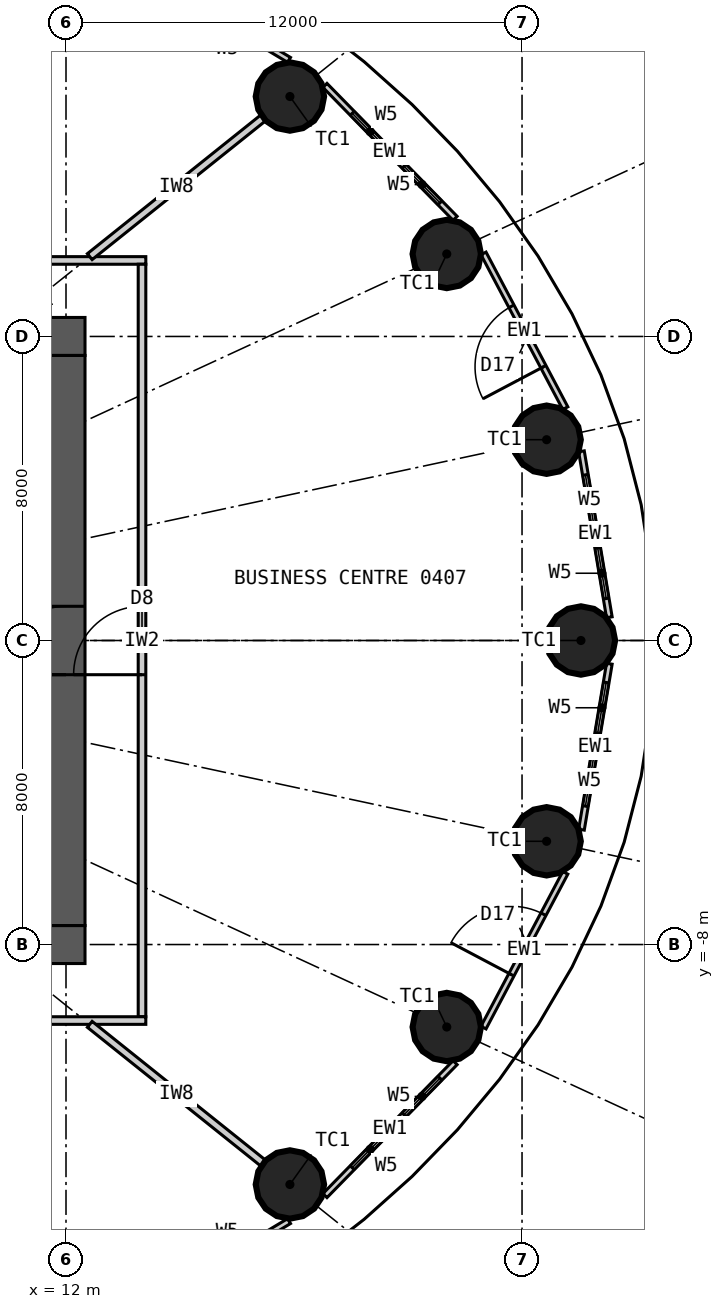
"""IFC4 building model, lengths in metres.
Left out: names, types, materials, properties, quantities, classifications, styles, units other than length and angle.
Written with IfcOpenShell. Run it as: python <this file> out.ifc"""

import sys

from ifc_helpers import new_model, si_unit, direction, frame, frame_2d, origin, origin_2d, place, context, subcontext, project, spatial, rectangle, circle, extrude, element, fill, save


model = new_model("IFC4")
c1 = context("Model", 3, precision=1e-05, world=origin(), true_north=direction((0.0, 1.0)))
c2 = subcontext(c1, "Body", "Model", "MODEL_VIEW")
j1 = project(units=[si_unit("LENGTHUNIT", "METRE"), si_unit("PLANEANGLEUNIT", "RADIAN")], contexts=[c1])
p1 = place(None, origin())
s1 = spatial("IfcSite", under=j1, at=p1, CompositionType="ELEMENT")
p2 = place(p1, origin())
s2 = spatial("IfcBuilding", under=s1, at=p2, CompositionType="ELEMENT")
p3 = place(p2, frame((0.0, 0.0, 24.6)))
s3 = spatial("IfcBuildingStorey", under=s2, at=p3, CompositionType="ELEMENT", Elevation=24.6)
for number, where, z_axis, x_axis in (
    (1, (25.55, 0.0, 0.0), (0.0, 0.0, 1.0), (1.0, 0.0, 0.0)),
    (2, (24.647, 5.283, 0.0), (0.0, 0.0, 1.0), (1.0, 0.0, 0.0)),
    (3, (22.019, 10.17, 0.0), (0.0, 0.0, 1.0), (1.0, 0.0, 0.0)),
    (4, (17.892, 14.313, 0.0), (0.0, 0.0, 1.0), (1.0, 0.0, 0.0)),
    (5, (17.892, -14.313, 0.0), (0.0, 0.0, 1.0), (1.0, 0.0, 0.0)),
    (6, (22.019, -10.17, 0.0), (0.0, 0.0, 1.0), (1.0, 0.0, 0.0)),
    (7, (24.647, -5.283, 0.0), (0.0, 0.0, 1.0), (1.0, 0.0, 0.0)),
):
    element("IfcColumn", number, at=place(p3, frame(where, z_axis=z_axis, x_axis=x_axis)), inside=s3, PredefinedType="COLUMN", context=c2, shape_type="SweptSolid", body=[
        extrude(circle(Radius=0.9, at=origin_2d()), origin(), (0.0, 0.0, 1.0), 4.8),
    ])
p4 = place(p3, frame((-12.5, 8.0, 0.0), z_axis=(0.0, 0.0, 1.0), x_axis=(1.0, 0.0, 0.0)))
e8 = element("IfcWall", 8, at=p4, inside=s3, PredefinedType="SHEAR", context=c2, shape_type="SweptSolid", body=[
    extrude(rectangle(XDim=25.0, YDim=1.0, at=frame_2d((12.5, 0.0))), origin(), (0.0, 0.0, 1.0), 4.8),
])
p5 = place(p4, frame((11.2, 0.0, 0.0)))
e9 = element("IfcOpeningElement", 9, at=p5, cuts=e8, PredefinedType="OPENING", context=c2, shape_type="SweptSolid", body=[
    extrude(rectangle(XDim=1.2, YDim=2.2, at=frame_2d((0.6, 1.1))), frame((0.0, 0.51, 0.0), z_axis=(0.0, -1.0, 0.0), x_axis=(1.0, 0.0, 0.0)), (0.0, 0.0, 1.0), 1.02),
])
p6 = place(p4, frame((18.8, 0.0, 0.0)))
e10 = element("IfcOpeningElement", 10, at=p6, cuts=e8, PredefinedType="OPENING", context=c2, shape_type="SweptSolid", body=[
    extrude(rectangle(XDim=0.9, YDim=2.2, at=frame_2d((0.45, 1.1))), frame((0.0, 0.51, 0.0), z_axis=(0.0, -1.0, 0.0), x_axis=(1.0, 0.0, 0.0)), (0.0, 0.0, 1.0), 1.02),
])
p7 = place(p3, frame((12.5, -8.0, 0.0), z_axis=(0.0, 0.0, 1.0), x_axis=(-1.0, 0.0, 0.0)))
e11 = element("IfcWall", 11, at=p7, inside=s3, PredefinedType="SHEAR", context=c2, shape_type="SweptSolid", body=[
    extrude(rectangle(XDim=25.0, YDim=1.0, at=frame_2d((12.5, 0.0))), origin(), (0.0, 0.0, 1.0), 4.8),
])
p8 = place(p7, frame((11.2, 0.0, 0.0)))
e12 = element("IfcOpeningElement", 12, at=p8, cuts=e11, PredefinedType="OPENING", context=c2, shape_type="SweptSolid", body=[
    extrude(rectangle(XDim=1.2, YDim=2.2, at=frame_2d((0.6, 1.1))), frame((0.0, 0.51, 0.0), z_axis=(0.0, -1.0, 0.0), x_axis=(1.0, 0.0, 0.0)), (0.0, 0.0, 1.0), 1.02),
])
p9 = place(p7, frame((18.8, 0.0, 0.0)))
e13 = element("IfcOpeningElement", 13, at=p9, cuts=e11, PredefinedType="OPENING", context=c2, shape_type="SweptSolid", body=[
    extrude(rectangle(XDim=0.9, YDim=2.2, at=frame_2d((0.45, 1.1))), frame((0.0, 0.51, 0.0), z_axis=(0.0, -1.0, 0.0), x_axis=(1.0, 0.0, 0.0)), (0.0, 0.0, 1.0), 1.02),
])
p10 = place(p3, frame((12.0, -7.5, 0.0), z_axis=(0.0, 0.0, 1.0), x_axis=(0.0, 1.0, 0.0)))
e14 = element("IfcWall", 14, at=p10, inside=s3, PredefinedType="SHEAR", context=c2, shape_type="SweptSolid", body=[
    extrude(rectangle(XDim=15.0, YDim=1.0, at=frame_2d((7.5, 0.0))), origin(), (0.0, 0.0, 1.0), 4.8),
])
p11 = place(p10, frame((6.6, 0.0, 0.0)))
e15 = element("IfcOpeningElement", 15, at=p11, cuts=e14, PredefinedType="OPENING", context=c2, shape_type="SweptSolid", body=[
    extrude(rectangle(XDim=1.8, YDim=2.2, at=frame_2d((0.9, 1.1))), frame((0.0, 0.51, 0.0), z_axis=(0.0, -1.0, 0.0), x_axis=(1.0, 0.0, 0.0)), (0.0, 0.0, 1.0), 1.02),
])
p12 = place(p3, frame((26.297, 0.611, 0.0), z_axis=(0.0, 0.0, 1.0), x_axis=(-0.165641751141, 0.986185991727, 0.0)))
e16 = element("IfcWall", 16, at=p12, inside=s3, PredefinedType="ELEMENTEDWALL", context=c2, shape_type="SweptSolid", body=[
    extrude(rectangle(XDim=4.428, YDim=0.15, at=frame_2d((2.214, 0.0))), origin(), (0.0, 0.0, 1.0), 4.62),
])
p13 = place(p12, frame((0.5, 0.0, 0.6)))
e17 = element("IfcOpeningElement", 17, at=p13, cuts=e16, PredefinedType="OPENING", context=c2, shape_type="SweptSolid", body=[
    extrude(rectangle(XDim=1.35, YDim=3.0, at=frame_2d((0.675, 1.5))), frame((0.0, 0.085, 0.0), z_axis=(0.0, -1.0, 0.0), x_axis=(1.0, 0.0, 0.0)), (0.0, 0.0, 1.0), 0.17),
])
p14 = place(p12, frame((2.45, 0.0, 0.6)))
e18 = element("IfcOpeningElement", 18, at=p14, cuts=e16, PredefinedType="OPENING", context=c2, shape_type="SweptSolid", body=[
    extrude(rectangle(XDim=1.35, YDim=3.0, at=frame_2d((0.675, 1.5))), frame((0.0, 0.085, 0.0), z_axis=(0.0, -1.0, 0.0), x_axis=(1.0, 0.0, 0.0)), (0.0, 0.0, 1.0), 0.17),
])
p15 = place(p3, frame((25.139, 6.113, 0.0), z_axis=(0.0, 0.0, 1.0), x_axis=(-0.467303182954, 0.884097129959, 0.0)))
e19 = element("IfcWall", 19, at=p15, inside=s3, PredefinedType="ELEMENTEDWALL", context=c2, shape_type="SweptSolid", body=[
    extrude(rectangle(XDim=4.606, YDim=0.15, at=frame_2d((2.303, 0.0))), origin(), (0.0, 0.0, 1.0), 4.62),
])
p16 = place(p15, frame((1.231, 0.0, 0.0)))
e20 = element("IfcOpeningElement", 20, at=p16, cuts=e19, PredefinedType="OPENING", context=c2, shape_type="SweptSolid", body=[
    extrude(rectangle(XDim=1.8, YDim=2.7, at=frame_2d((0.9, 1.35))), frame((0.0, 0.085, 0.0), z_axis=(0.0, -1.0, 0.0), x_axis=(1.0, 0.0, 0.0)), (0.0, 0.0, 1.0), 0.17),
])
p17 = place(p3, frame((22.239, 11.108, 0.0), z_axis=(0.0, 0.0, 1.0), x_axis=(-0.699612594083, 0.714522370679, 0.0)))
e21 = element("IfcWall", 21, at=p17, inside=s3, PredefinedType="ELEMENTEDWALL", context=c2, shape_type="SweptSolid", body=[
    extrude(rectangle(XDim=4.896, YDim=0.15, at=frame_2d((2.448, 0.0))), origin(), (0.0, 0.0, 1.0), 4.62),
])
p18 = place(p17, frame((0.569, 0.0, 0.6)))
e22 = element("IfcOpeningElement", 22, at=p18, cuts=e21, PredefinedType="OPENING", context=c2, shape_type="SweptSolid", body=[
    extrude(rectangle(XDim=1.35, YDim=3.0, at=frame_2d((0.675, 1.5))), frame((0.0, 0.085, 0.0), z_axis=(0.0, -1.0, 0.0), x_axis=(1.0, 0.0, 0.0)), (0.0, 0.0, 1.0), 0.17),
])
p19 = place(p17, frame((2.519, 0.0, 0.6)))
e23 = element("IfcOpeningElement", 23, at=p19, cuts=e21, PredefinedType="OPENING", context=c2, shape_type="SweptSolid", body=[
    extrude(rectangle(XDim=1.35, YDim=3.0, at=frame_2d((0.675, 1.5))), frame((0.0, 0.085, 0.0), z_axis=(0.0, -1.0, 0.0), x_axis=(1.0, 0.0, 0.0)), (0.0, 0.0, 1.0), 0.17),
])
p20 = place(p3, frame((17.869, 15.277, 0.0), z_axis=(0.0, 0.0, 1.0), x_axis=(-0.856958191554, 0.515385931054, 0.0)))
e24 = element("IfcWall", 24, at=p20, inside=s3, PredefinedType="ELEMENTEDWALL", context=c2, shape_type="SweptSolid", body=[
    extrude(rectangle(XDim=5.201, YDim=0.15, at=frame_2d((2.601, 0.0))), origin(), (0.0, 0.0, 1.0), 4.62),
])
p21 = place(p20, frame((0.726, 0.0, 0.6)))
e25 = element("IfcOpeningElement", 25, at=p21, cuts=e24, PredefinedType="OPENING", context=c2, shape_type="SweptSolid", body=[
    extrude(rectangle(XDim=1.35, YDim=3.0, at=frame_2d((0.675, 1.5))), frame((0.0, 0.085, 0.0), z_axis=(0.0, -1.0, 0.0), x_axis=(1.0, 0.0, 0.0)), (0.0, 0.0, 1.0), 0.17),
])
p22 = place(p20, frame((2.676, 0.0, 0.6)))
e26 = element("IfcOpeningElement", 26, at=p22, cuts=e24, PredefinedType="OPENING", context=c2, shape_type="SweptSolid", body=[
    extrude(rectangle(XDim=1.35, YDim=3.0, at=frame_2d((0.675, 1.5))), frame((0.0, 0.085, 0.0), z_axis=(0.0, -1.0, 0.0), x_axis=(1.0, 0.0, 0.0)), (0.0, 0.0, 1.0), 0.17),
])
p23 = place(p3, frame((13.412, -17.957, 0.0), z_axis=(0.0, 0.0, 1.0), x_axis=(0.856958191554, 0.515385931054, 0.0)))
e27 = element("IfcWall", 27, at=p23, inside=s3, PredefinedType="ELEMENTEDWALL", context=c2, shape_type="SweptSolid", body=[
    extrude(rectangle(XDim=5.201, YDim=0.15, at=frame_2d((2.601, 0.0))), origin(), (0.0, 0.0, 1.0), 4.62),
])
p24 = place(p23, frame((1.175, 0.0, 0.6)))
e28 = element("IfcOpeningElement", 28, at=p24, cuts=e27, PredefinedType="OPENING", context=c2, shape_type="SweptSolid", body=[
    extrude(rectangle(XDim=1.35, YDim=3.0, at=frame_2d((0.675, 1.5))), frame((0.0, 0.085, 0.0), z_axis=(0.0, -1.0, 0.0), x_axis=(1.0, 0.0, 0.0)), (0.0, 0.0, 1.0), 0.17),
])
p25 = place(p23, frame((3.125, 0.0, 0.6)))
e29 = element("IfcOpeningElement", 29, at=p25, cuts=e27, PredefinedType="OPENING", context=c2, shape_type="SweptSolid", body=[
    extrude(rectangle(XDim=1.35, YDim=3.0, at=frame_2d((0.675, 1.5))), frame((0.0, 0.085, 0.0), z_axis=(0.0, -1.0, 0.0), x_axis=(1.0, 0.0, 0.0)), (0.0, 0.0, 1.0), 0.17),
])
p26 = place(p3, frame((18.813, -14.607, 0.0), z_axis=(0.0, 0.0, 1.0), x_axis=(0.699612594083, 0.714522370679, 0.0)))
e30 = element("IfcWall", 30, at=p26, inside=s3, PredefinedType="ELEMENTEDWALL", context=c2, shape_type="SweptSolid", body=[
    extrude(rectangle(XDim=4.896, YDim=0.15, at=frame_2d((2.448, 0.0))), origin(), (0.0, 0.0, 1.0), 4.62),
])
p27 = place(p26, frame((1.027, 0.0, 0.6)))
e31 = element("IfcOpeningElement", 31, at=p27, cuts=e30, PredefinedType="OPENING", context=c2, shape_type="SweptSolid", body=[
    extrude(rectangle(XDim=1.35, YDim=3.0, at=frame_2d((0.675, 1.5))), frame((0.0, 0.085, 0.0), z_axis=(0.0, -1.0, 0.0), x_axis=(1.0, 0.0, 0.0)), (0.0, 0.0, 1.0), 0.17),
])
p28 = place(p26, frame((2.977, 0.0, 0.6)))
e32 = element("IfcOpeningElement", 32, at=p28, cuts=e30, PredefinedType="OPENING", context=c2, shape_type="SweptSolid", body=[
    extrude(rectangle(XDim=1.35, YDim=3.0, at=frame_2d((0.675, 1.5))), frame((0.0, 0.085, 0.0), z_axis=(0.0, -1.0, 0.0), x_axis=(1.0, 0.0, 0.0)), (0.0, 0.0, 1.0), 0.17),
])
p29 = place(p3, frame((22.986, -10.185, 0.0), z_axis=(0.0, 0.0, 1.0), x_axis=(0.467303182954, 0.884097129959, 0.0)))
e33 = element("IfcWall", 33, at=p29, inside=s3, PredefinedType="ELEMENTEDWALL", context=c2, shape_type="SweptSolid", body=[
    extrude(rectangle(XDim=4.606, YDim=0.15, at=frame_2d((2.303, 0.0))), origin(), (0.0, 0.0, 1.0), 4.62),
])
p30 = place(p29, frame((1.575, 0.0, 0.0)))
e34 = element("IfcOpeningElement", 34, at=p30, cuts=e33, PredefinedType="OPENING", context=c2, shape_type="SweptSolid", body=[
    extrude(rectangle(XDim=1.8, YDim=2.7, at=frame_2d((0.9, 1.35))), frame((0.0, 0.085, 0.0), z_axis=(0.0, -1.0, 0.0), x_axis=(1.0, 0.0, 0.0)), (0.0, 0.0, 1.0), 0.17),
])
p31 = place(p3, frame((25.564, -4.978, 0.0), z_axis=(0.0, 0.0, 1.0), x_axis=(0.165641751141, 0.986185991727, 0.0)))
e35 = element("IfcWall", 35, at=p31, inside=s3, PredefinedType="ELEMENTEDWALL", context=c2, shape_type="SweptSolid", body=[
    extrude(rectangle(XDim=4.428, YDim=0.15, at=frame_2d((2.214, 0.0))), origin(), (0.0, 0.0, 1.0), 4.62),
])
p32 = place(p31, frame((0.628, 0.0, 0.6)))
e36 = element("IfcOpeningElement", 36, at=p32, cuts=e35, PredefinedType="OPENING", context=c2, shape_type="SweptSolid", body=[
    extrude(rectangle(XDim=1.35, YDim=3.0, at=frame_2d((0.675, 1.5))), frame((0.0, 0.085, 0.0), z_axis=(0.0, -1.0, 0.0), x_axis=(1.0, 0.0, 0.0)), (0.0, 0.0, 1.0), 0.17),
])
p33 = place(p31, frame((2.578, 0.0, 0.6)))
e37 = element("IfcOpeningElement", 37, at=p33, cuts=e35, PredefinedType="OPENING", context=c2, shape_type="SweptSolid", body=[
    extrude(rectangle(XDim=1.35, YDim=3.0, at=frame_2d((0.675, 1.5))), frame((0.0, 0.085, 0.0), z_axis=(0.0, -1.0, 0.0), x_axis=(1.0, 0.0, 0.0)), (0.0, 0.0, 1.0), 0.17),
])
p34 = place(p3, frame((-14.1, 10.0, 0.0), z_axis=(0.0, 0.0, 1.0), x_axis=(1.0, 0.0, 0.0)))
e38 = element("IfcWall", 38, at=p34, inside=s3, PredefinedType="PARTITIONING", context=c2, shape_type="SweptSolid", body=[
    extrude(rectangle(XDim=28.2, YDim=0.2, at=frame_2d((14.1, 0.0))), origin(), (0.0, 0.0, 1.0), 4.62),
])
p35 = place(p34, frame((13.2, 0.0, 0.0)))
e39 = element("IfcOpeningElement", 39, at=p35, cuts=e38, PredefinedType="OPENING", context=c2, shape_type="SweptSolid", body=[
    extrude(rectangle(XDim=1.8, YDim=2.4, at=frame_2d((0.9, 1.2))), frame((0.0, 0.11, 0.0), z_axis=(0.0, -1.0, 0.0), x_axis=(1.0, 0.0, 0.0)), (0.0, 0.0, 1.0), 0.22),
])
p36 = place(p3, frame((14.0, -9.9, 0.0), z_axis=(0.0, 0.0, 1.0), x_axis=(0.0, 1.0, 0.0)))
e40 = element("IfcWall", 40, at=p36, inside=s3, PredefinedType="PARTITIONING", context=c2, shape_type="SweptSolid", body=[
    extrude(rectangle(XDim=19.8, YDim=0.2, at=frame_2d((9.9, 0.0))), origin(), (0.0, 0.0, 1.0), 4.62),
])
p37 = place(p36, frame((9.0, 0.0, 0.0)))
e41 = element("IfcOpeningElement", 41, at=p37, cuts=e40, PredefinedType="OPENING", context=c2, shape_type="SweptSolid", body=[
    extrude(rectangle(XDim=1.8, YDim=2.4, at=frame_2d((0.9, 1.2))), frame((0.0, 0.11, 0.0), z_axis=(0.0, -1.0, 0.0), x_axis=(1.0, 0.0, 0.0)), (0.0, 0.0, 1.0), 0.22),
])
p38 = place(p3, frame((14.1, -10.0, 0.0), z_axis=(0.0, 0.0, 1.0), x_axis=(-1.0, 0.0, 0.0)))
e42 = element("IfcWall", 42, at=p38, inside=s3, PredefinedType="PARTITIONING", context=c2, shape_type="SweptSolid", body=[
    extrude(rectangle(XDim=28.2, YDim=0.2, at=frame_2d((14.1, 0.0))), origin(), (0.0, 0.0, 1.0), 4.62),
])
p39 = place(p38, frame((13.2, 0.0, 0.0)))
e43 = element("IfcOpeningElement", 43, at=p39, cuts=e42, PredefinedType="OPENING", context=c2, shape_type="SweptSolid", body=[
    extrude(rectangle(XDim=1.8, YDim=2.4, at=frame_2d((0.9, 1.2))), frame((0.0, 0.11, 0.0), z_axis=(0.0, -1.0, 0.0), x_axis=(1.0, 0.0, 0.0)), (0.0, 0.0, 1.0), 0.22),
])
for number, where, z_axis, x_axis in (
    (44, (12.625, 10.1, 0.0), (0.0, 0.0, 1.0), (0.781, 0.625, 0.0)),
    (45, (12.625, -10.1, 0.0), (0.0, 0.0, 1.0), (0.781, -0.625, 0.0)),
):
    element("IfcWall", number, at=place(p3, frame(where, z_axis=z_axis, x_axis=x_axis)), inside=s3, PredefinedType="PARTITIONING", context=c2, shape_type="SweptSolid", body=[
        extrude(rectangle(XDim=5.845, YDim=0.2, at=frame_2d((2.922, 0.0))), origin(), (0.0, 0.0, 1.0), 3.82),
    ])
p40 = place(p13, origin())
e46 = element("IfcWindow", 46, at=p40, inside=s3, PartitioningType="SINGLE_PANEL", PredefinedType="WINDOW", context=c2, shape_type="SweptSolid", body=[
    extrude(rectangle(XDim=1.35, YDim=3.0, at=frame_2d((0.675, 1.5))), frame((0.0, 0.03, 0.0), z_axis=(0.0, -1.0, 0.0), x_axis=(1.0, 0.0, 0.0)), (0.0, 0.0, 1.0), 0.06),
])
fill(e17, e46)
p41 = place(p14, origin())
e47 = element("IfcWindow", 47, at=p41, inside=s3, PartitioningType="SINGLE_PANEL", PredefinedType="WINDOW", context=c2, shape_type="SweptSolid", body=[
    extrude(rectangle(XDim=1.35, YDim=3.0, at=frame_2d((0.675, 1.5))), frame((0.0, 0.03, 0.0), z_axis=(0.0, -1.0, 0.0), x_axis=(1.0, 0.0, 0.0)), (0.0, 0.0, 1.0), 0.06),
])
fill(e18, e47)
p42 = place(p16, origin())
e48 = element("IfcDoor", 48, at=p42, inside=s3, OperationType="DOUBLE_DOOR_DOUBLE_SWING", PredefinedType="DOOR", context=c2, shape_type="SweptSolid", body=[
    extrude(rectangle(XDim=1.8, YDim=2.7, at=frame_2d((0.9, 1.35))), frame((0.0, 0.025, 0.0), z_axis=(0.0, -1.0, 0.0), x_axis=(1.0, 0.0, 0.0)), (0.0, 0.0, 1.0), 0.05),
])
fill(e20, e48)
p43 = place(p18, origin())
e49 = element("IfcWindow", 49, at=p43, inside=s3, PartitioningType="SINGLE_PANEL", PredefinedType="WINDOW", context=c2, shape_type="SweptSolid", body=[
    extrude(rectangle(XDim=1.35, YDim=3.0, at=frame_2d((0.675, 1.5))), frame((0.0, 0.03, 0.0), z_axis=(0.0, -1.0, 0.0), x_axis=(1.0, 0.0, 0.0)), (0.0, 0.0, 1.0), 0.06),
])
fill(e22, e49)
p44 = place(p19, origin())
e50 = element("IfcWindow", 50, at=p44, inside=s3, PartitioningType="SINGLE_PANEL", PredefinedType="WINDOW", context=c2, shape_type="SweptSolid", body=[
    extrude(rectangle(XDim=1.35, YDim=3.0, at=frame_2d((0.675, 1.5))), frame((0.0, 0.03, 0.0), z_axis=(0.0, -1.0, 0.0), x_axis=(1.0, 0.0, 0.0)), (0.0, 0.0, 1.0), 0.06),
])
fill(e23, e50)
p45 = place(p27, origin())
e51 = element("IfcWindow", 51, at=p45, inside=s3, PartitioningType="SINGLE_PANEL", PredefinedType="WINDOW", context=c2, shape_type="SweptSolid", body=[
    extrude(rectangle(XDim=1.35, YDim=3.0, at=frame_2d((0.675, 1.5))), frame((0.0, 0.03, 0.0), z_axis=(0.0, -1.0, 0.0), x_axis=(1.0, 0.0, 0.0)), (0.0, 0.0, 1.0), 0.06),
])
fill(e31, e51)
p46 = place(p28, origin())
e52 = element("IfcWindow", 52, at=p46, inside=s3, PartitioningType="SINGLE_PANEL", PredefinedType="WINDOW", context=c2, shape_type="SweptSolid", body=[
    extrude(rectangle(XDim=1.35, YDim=3.0, at=frame_2d((0.675, 1.5))), frame((0.0, 0.03, 0.0), z_axis=(0.0, -1.0, 0.0), x_axis=(1.0, 0.0, 0.0)), (0.0, 0.0, 1.0), 0.06),
])
fill(e32, e52)
p47 = place(p30, origin())
e53 = element("IfcDoor", 53, at=p47, inside=s3, OperationType="DOUBLE_DOOR_DOUBLE_SWING", PredefinedType="DOOR", context=c2, shape_type="SweptSolid", body=[
    extrude(rectangle(XDim=1.8, YDim=2.7, at=frame_2d((0.9, 1.35))), frame((0.0, 0.025, 0.0), z_axis=(0.0, -1.0, 0.0), x_axis=(1.0, 0.0, 0.0)), (0.0, 0.0, 1.0), 0.05),
])
fill(e34, e53)
p48 = place(p32, origin())
e54 = element("IfcWindow", 54, at=p48, inside=s3, PartitioningType="SINGLE_PANEL", PredefinedType="WINDOW", context=c2, shape_type="SweptSolid", body=[
    extrude(rectangle(XDim=1.35, YDim=3.0, at=frame_2d((0.675, 1.5))), frame((0.0, 0.03, 0.0), z_axis=(0.0, -1.0, 0.0), x_axis=(1.0, 0.0, 0.0)), (0.0, 0.0, 1.0), 0.06),
])
fill(e36, e54)
p49 = place(p33, origin())
e55 = element("IfcWindow", 55, at=p49, inside=s3, PartitioningType="SINGLE_PANEL", PredefinedType="WINDOW", context=c2, shape_type="SweptSolid", body=[
    extrude(rectangle(XDim=1.35, YDim=3.0, at=frame_2d((0.675, 1.5))), frame((0.0, 0.03, 0.0), z_axis=(0.0, -1.0, 0.0), x_axis=(1.0, 0.0, 0.0)), (0.0, 0.0, 1.0), 0.06),
])
fill(e37, e55)
p50 = place(p37, origin())
e56 = element("IfcDoor", 56, at=p50, inside=s3, OperationType="DOUBLE_DOOR_DOUBLE_SWING", PredefinedType="DOOR", context=c2, shape_type="SweptSolid", body=[
    extrude(rectangle(XDim=1.8, YDim=2.4, at=frame_2d((0.9, 1.2))), frame((0.0, 0.025, 0.0), z_axis=(0.0, -1.0, 0.0), x_axis=(1.0, 0.0, 0.0)), (0.0, 0.0, 1.0), 0.05),
])
fill(e41, e56)
p51 = place(p11, origin())
e57 = element("IfcDoor", 57, at=p51, inside=s3, OperationType="DOUBLE_DOOR_DOUBLE_SWING", PredefinedType="DOOR", context=c2, shape_type="SweptSolid", body=[
    extrude(rectangle(XDim=1.8, YDim=2.2, at=frame_2d((0.9, 1.1))), frame((0.0, 0.025, 0.0), z_axis=(0.0, -1.0, 0.0), x_axis=(1.0, 0.0, 0.0)), (0.0, 0.0, 1.0), 0.05),
])
fill(e15, e57)
save(model, sys.argv[1])
